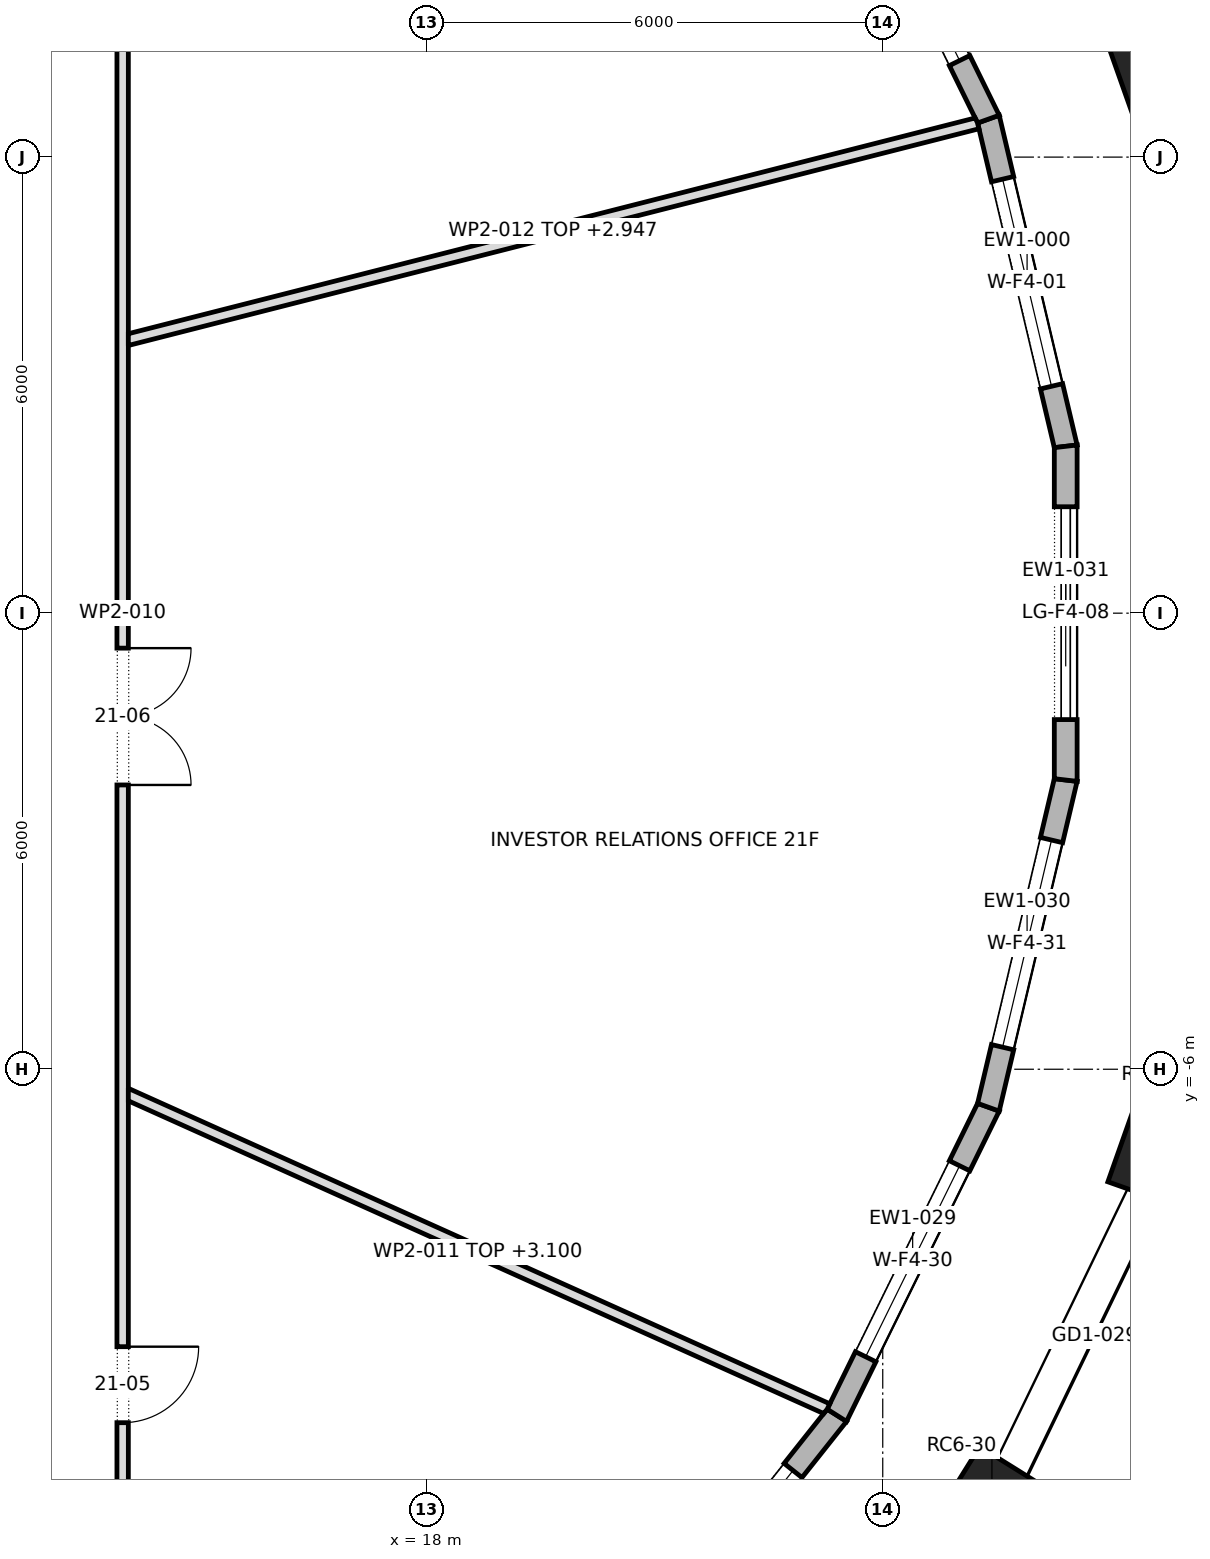
"""IFC4 building model, lengths in metres.
Left out: names, types, materials, properties, quantities, classifications, styles, units other than length and angle.
Written with IfcOpenShell. Run it as: python <this file> out.ifc"""

import sys

from ifc_helpers import new_model, si_unit, direction, frame, frame_2d, origin, origin_2d, place, context, subcontext, project, spatial, polyline, rectangle, outline, extrude, element, fill, save


model = new_model("IFC4")
c1 = context("Model", 3, precision=1e-05, world=origin(), true_north=direction((0.0, 1.0)))
c2 = subcontext(c1, "Body", "Model", "MODEL_VIEW")
j1 = project(units=[si_unit("LENGTHUNIT", "METRE"), si_unit("PLANEANGLEUNIT", "RADIAN")], contexts=[c1])
p1 = place(None, origin())
s1 = spatial("IfcSite", under=j1, at=p1, CompositionType="ELEMENT")
p2 = place(p1, origin())
s2 = spatial("IfcBuilding", under=s1, at=p2, CompositionType="ELEMENT")
p3 = place(p2, frame((0.0, 0.0, 300.3)))
s3 = spatial("IfcBuildingStorey", under=s2, at=p3, CompositionType="ELEMENT", Elevation=300.3)
for number, where, z_axis, x_axis in (
    (1, (27.6, 7.177, 0.0), (0.0, 0.0, 1.0), (-0.334, 0.943, 0.0)),
    (2, (25.437, -11.654, 0.0), (0.0, 0.0, 1.0), (0.529, 0.849, 0.0)),
    (3, (27.6, -7.177, 0.0), (0.0, 0.0, 1.0), (0.334, 0.943, 0.0)),
):
    element("IfcColumn", number, at=place(p3, frame(where, z_axis=z_axis, x_axis=x_axis)), inside=s3, PredefinedType="COLUMN", context=c2, shape_type="SweptSolid", body=[
        extrude(rectangle(XDim=1.0, YDim=1.0, at=origin_2d()), origin(), (0.0, 0.0, 1.0), 4.0),
    ])
p4 = place(p3, frame((26.407, 2.195, 0.0), z_axis=(0.0, 0.0, 1.0), x_axis=(-0.229943714271, 0.973203929435, 0.0)))
e4 = element("IfcWall", 4, at=p4, inside=s3, PredefinedType="STANDARD", context=c2, shape_type="SweptSolid", body=[
    extrude(outline(polyline([(-0.018, -0.15), (4.44, -0.15), (4.406, 0.15), (0.018, 0.15), (-0.018, -0.15)])), origin(), (0.0, 0.0, 1.0), 3.7),
])
p5 = place(p4, frame((0.812, 0.0, 0.6)))
e5 = element("IfcOpeningElement", 5, at=p5, cuts=e4, PredefinedType="OPENING", context=c2, shape_type="SweptSolid", body=[
    extrude(rectangle(XDim=2.8, YDim=2.65, at=frame_2d((1.4, 1.325))), frame((0.0, 0.162, 0.0), z_axis=(0.0, -1.0, 0.0), x_axis=(1.0, 0.0, 0.0)), (0.0, 0.0, 1.0), 0.324),
])
p6 = place(p3, frame((25.39, 6.5, 0.0), z_axis=(0.0, 0.0, 1.0), x_axis=(-0.441431671743, 0.897294867467, 0.0)))
e6 = element("IfcWall", 6, at=p6, inside=s3, PredefinedType="STANDARD", context=c2, shape_type="SweptSolid", body=[
    extrude(outline(polyline([(-0.017, -0.15), (4.533, -0.15), (4.501, 0.15), (0.017, 0.15), (-0.017, -0.15)])), origin(), (0.0, 0.0, 1.0), 3.7),
])
p7 = place(p6, frame((0.858, 0.0, 0.6)))
e7 = element("IfcOpeningElement", 7, at=p7, cuts=e6, PredefinedType="OPENING", context=c2, shape_type="SweptSolid", body=[
    extrude(rectangle(XDim=2.8, YDim=2.65, at=frame_2d((1.4, 1.325))), frame((0.0, 0.162, 0.0), z_axis=(0.0, -1.0, 0.0), x_axis=(1.0, 0.0, 0.0)), (0.0, 0.0, 1.0), 0.324),
])
p8 = place(p3, frame((20.503, -14.198, 0.0), z_axis=(0.0, 0.0, 1.0), x_axis=(0.621625671247, 0.783314448256, 0.0)))
e8 = element("IfcWall", 8, at=p8, inside=s3, PredefinedType="STANDARD", context=c2, shape_type="SweptSolid", body=[
    extrude(outline(polyline([(-0.015, -0.15), (4.67, -0.15), (4.637, 0.15), (0.015, 0.15), (-0.015, -0.15)])), origin(), (0.0, 0.0, 1.0), 3.7),
])
p9 = place(p8, frame((0.927, 0.0, 0.6)))
e9 = element("IfcOpeningElement", 9, at=p9, cuts=e8, PredefinedType="OPENING", context=c2, shape_type="SweptSolid", body=[
    extrude(rectangle(XDim=2.8, YDim=2.65, at=frame_2d((1.4, 1.325))), frame((0.0, 0.162, 0.0), z_axis=(0.0, -1.0, 0.0), x_axis=(1.0, 0.0, 0.0)), (0.0, 0.0, 1.0), 0.324),
])
p10 = place(p3, frame((23.396, -10.553, 0.0), z_axis=(0.0, 0.0, 1.0), x_axis=(0.441431671743, 0.897294867467, 0.0)))
e10 = element("IfcWall", 10, at=p10, inside=s3, PredefinedType="STANDARD", context=c2, shape_type="SweptSolid", body=[
    extrude(outline(polyline([(-0.016, -0.15), (4.534, -0.15), (4.5, 0.15), (0.016, 0.15), (-0.016, -0.15)])), origin(), (0.0, 0.0, 1.0), 3.7),
])
p11 = place(p10, frame((0.858, 0.0, 0.6)))
e11 = element("IfcOpeningElement", 11, at=p11, cuts=e10, PredefinedType="OPENING", context=c2, shape_type="SweptSolid", body=[
    extrude(rectangle(XDim=2.8, YDim=2.65, at=frame_2d((1.4, 1.325))), frame((0.0, 0.162, 0.0), z_axis=(0.0, -1.0, 0.0), x_axis=(1.0, 0.0, 0.0)), (0.0, 0.0, 1.0), 0.324),
])
p12 = place(p3, frame((25.39, -6.5, 0.0), z_axis=(0.0, 0.0, 1.0), x_axis=(0.229943714271, 0.973203929435, 0.0)))
e12 = element("IfcWall", 12, at=p12, inside=s3, PredefinedType="STANDARD", context=c2, shape_type="SweptSolid", body=[
    extrude(outline(polyline([(-0.017, -0.15), (4.441, -0.15), (4.406, 0.15), (0.017, 0.15), (-0.017, -0.15)])), origin(), (0.0, 0.0, 1.0), 3.7),
])
p13 = place(p12, frame((0.812, 0.0, 0.6)))
e13 = element("IfcOpeningElement", 13, at=p13, cuts=e12, PredefinedType="OPENING", context=c2, shape_type="SweptSolid", body=[
    extrude(rectangle(XDim=2.8, YDim=2.65, at=frame_2d((1.4, 1.325))), frame((0.0, 0.162, 0.0), z_axis=(0.0, -1.0, 0.0), x_axis=(1.0, 0.0, 0.0)), (0.0, 0.0, 1.0), 0.324),
])
p14 = place(p3, frame((26.407, -2.195, 0.0), z_axis=(0.0, 0.0, 1.0), x_axis=(0.0, 1.0, 0.0)))
e14 = element("IfcWall", 14, at=p14, inside=s3, PredefinedType="STANDARD", context=c2, shape_type="SweptSolid", body=[
    extrude(outline(polyline([(-0.018, -0.15), (4.408, -0.15), (4.373, 0.15), (0.018, 0.15), (-0.018, -0.15)])), origin(), (0.0, 0.0, 1.0), 3.7),
])
p15 = place(p14, frame((0.795, 0.0, 0.0)))
e15 = element("IfcOpeningElement", 15, at=p15, cuts=e14, PredefinedType="OPENING", context=c2, shape_type="SweptSolid", body=[
    extrude(rectangle(XDim=2.8, YDim=3.25, at=frame_2d((1.4, 1.625))), frame((0.0, 0.162, 0.0), z_axis=(0.0, -1.0, 0.0), x_axis=(1.0, 0.0, 0.0)), (0.0, 0.0, 1.0), 0.324),
])
p16 = place(p3, frame((14.0, -14.075, 0.0), z_axis=(0.0, 0.0, 1.0), x_axis=(0.0, 1.0, 0.0)))
e16 = element("IfcWall", 16, at=p16, inside=s3, PredefinedType="PARTITIONING", context=c2, shape_type="SweptSolid", body=[
    extrude(outline(polyline([(0.0, -0.075), (1.877, -0.075), (3.753, -0.075), (5.63, -0.075), (7.507, -0.075), (9.383, -0.075), (11.26, -0.075), (13.137, -0.075), (15.013, -0.075), (16.89, -0.075), (18.767, -0.075), (20.643, -0.075), (22.52, -0.075), (24.396, -0.075), (26.273, -0.075), (28.15, -0.075), (28.0, 0.075), (26.011, 0.075), (24.021, 0.075), (22.032, 0.075), (20.043, 0.075), (18.053, 0.075), (16.064, 0.075), (14.075, 0.075), (12.086, 0.075), (10.096, 0.075), (8.107, 0.075), (6.118, 0.075), (4.128, 0.075), (2.139, 0.075), (0.15, 0.075), (0.0, -0.075)])), origin(), (0.0, 0.0, 1.0), 3.7),
])
p17 = place(p16, frame((3.425, 0.0, 0.0)))
e17 = element("IfcOpeningElement", 17, at=p17, cuts=e16, PredefinedType="OPENING", context=c2, shape_type="SweptSolid", body=[
    extrude(rectangle(XDim=1.0, YDim=2.1, at=frame_2d((0.5, 1.05))), frame((0.0, 0.087, 0.0), z_axis=(0.0, -1.0, 0.0), x_axis=(1.0, 0.0, 0.0)), (0.0, 0.0, 1.0), 0.174),
])
p18 = place(p16, frame((11.815, 0.0, 0.0)))
e18 = element("IfcOpeningElement", 18, at=p18, cuts=e16, PredefinedType="OPENING", context=c2, shape_type="SweptSolid", body=[
    extrude(rectangle(XDim=1.8, YDim=2.1, at=frame_2d((0.9, 1.05))), frame((0.0, 0.087, 0.0), z_axis=(0.0, -1.0, 0.0), x_axis=(1.0, 0.0, 0.0)), (0.0, 0.0, 1.0), 0.174),
])
p19 = place(p16, frame((21.965, 0.0, 0.0)))
e19 = element("IfcOpeningElement", 19, at=p19, cuts=e16, PredefinedType="OPENING", context=c2, shape_type="SweptSolid", body=[
    extrude(rectangle(XDim=1.8, YDim=2.1, at=frame_2d((0.9, 1.05))), frame((0.0, 0.087, 0.0), z_axis=(0.0, -1.0, 0.0), x_axis=(1.0, 0.0, 0.0)), (0.0, 0.0, 1.0), 0.174),
])
p20 = place(p3, frame((14.045, -6.32, 0.0), z_axis=(0.0, 0.0, 1.0), x_axis=(0.912030730905, -0.410121867114, 0.0)))
e20 = element("IfcWall", 20, at=p20, inside=s3, PredefinedType="PARTITIONING", context=c2, shape_type="SweptSolid", body=[
    extrude(outline(polyline([(0.067, -0.075), (1.739, -0.075), (3.41, -0.075), (5.082, -0.075), (6.754, -0.075), (8.426, -0.075), (10.097, -0.075), (10.115, -0.004), (10.118, 0.073), (10.118, 0.075), (8.432, 0.075), (6.745, 0.075), (5.059, 0.075), (3.373, 0.075), (1.686, 0.075), (0.0, 0.075), (0.0, 0.074), (0.067, -0.075)])), origin(), (0.0, 0.0, 1.0), 3.1),
])
p21 = place(p3, frame((14.057, 3.594, 0.0), z_axis=(0.0, 0.0, 1.0), x_axis=(0.969049648941, 0.246865910742, 0.0)))
e21 = element("IfcWall", 21, at=p21, inside=s3, PredefinedType="PARTITIONING", context=c2, shape_type="SweptSolid", body=[
    extrude(outline(polyline([(11.548, -0.075), (11.548, 0.011), (11.535, 0.075), (9.618, 0.075), (7.702, 0.075), (5.786, 0.075), (3.87, 0.075), (1.954, 0.075), (0.038, 0.075), (0.0, -0.074), (0.0, -0.075), (1.925, -0.075), (3.849, -0.075), (5.774, -0.075), (7.699, -0.075), (9.624, -0.075), (11.548, -0.075)])), origin(), (0.0, 0.0, 1.0), 2.947),
])
p22 = place(p5, origin())
e22 = element("IfcWindow", 22, at=p22, inside=s3, PartitioningType="DOUBLE_PANEL_VERTICAL", PredefinedType="WINDOW", context=c2, shape_type="SweptSolid", body=[
    extrude(rectangle(XDim=2.8, YDim=2.65, at=frame_2d((1.4, 1.325))), frame((0.0, 0.03, 0.0), z_axis=(0.0, -1.0, 0.0), x_axis=(1.0, 0.0, 0.0)), (0.0, 0.0, 1.0), 0.06),
])
fill(e5, e22)
p23 = place(p7, origin())
e23 = element("IfcWindow", 23, at=p23, inside=s3, PartitioningType="DOUBLE_PANEL_VERTICAL", PredefinedType="WINDOW", context=c2, shape_type="SweptSolid", body=[
    extrude(rectangle(XDim=2.8, YDim=2.65, at=frame_2d((1.4, 1.325))), frame((0.0, 0.03, 0.0), z_axis=(0.0, -1.0, 0.0), x_axis=(1.0, 0.0, 0.0)), (0.0, 0.0, 1.0), 0.06),
])
fill(e7, e23)
p24 = place(p9, origin())
e24 = element("IfcWindow", 24, at=p24, inside=s3, PartitioningType="DOUBLE_PANEL_VERTICAL", PredefinedType="WINDOW", context=c2, shape_type="SweptSolid", body=[
    extrude(rectangle(XDim=2.8, YDim=2.65, at=frame_2d((1.4, 1.325))), frame((0.0, 0.03, 0.0), z_axis=(0.0, -1.0, 0.0), x_axis=(1.0, 0.0, 0.0)), (0.0, 0.0, 1.0), 0.06),
])
fill(e9, e24)
p25 = place(p11, origin())
e25 = element("IfcWindow", 25, at=p25, inside=s3, PartitioningType="DOUBLE_PANEL_VERTICAL", PredefinedType="WINDOW", context=c2, shape_type="SweptSolid", body=[
    extrude(rectangle(XDim=2.8, YDim=2.65, at=frame_2d((1.4, 1.325))), frame((0.0, 0.03, 0.0), z_axis=(0.0, -1.0, 0.0), x_axis=(1.0, 0.0, 0.0)), (0.0, 0.0, 1.0), 0.06),
])
fill(e11, e25)
p26 = place(p13, origin())
e26 = element("IfcWindow", 26, at=p26, inside=s3, PartitioningType="DOUBLE_PANEL_VERTICAL", PredefinedType="WINDOW", context=c2, shape_type="SweptSolid", body=[
    extrude(rectangle(XDim=2.8, YDim=2.65, at=frame_2d((1.4, 1.325))), frame((0.0, 0.03, 0.0), z_axis=(0.0, -1.0, 0.0), x_axis=(1.0, 0.0, 0.0)), (0.0, 0.0, 1.0), 0.06),
])
fill(e13, e26)
p27 = place(p15, origin())
e27 = element("IfcDoor", 27, at=p27, inside=s3, OperationType="DOUBLE_DOOR_SLIDING", PredefinedType="DOOR", context=c2, shape_type="SweptSolid", body=[
    extrude(rectangle(XDim=2.8, YDim=3.25, at=frame_2d((1.4, 1.625))), frame((0.0, 0.025, 0.0), z_axis=(0.0, -1.0, 0.0), x_axis=(1.0, 0.0, 0.0)), (0.0, 0.0, 1.0), 0.05),
])
fill(e15, e27)
p28 = place(p17, frame((1.0, 0.0, 0.0), z_axis=(0.0, 0.0, 1.0), x_axis=(-1.0, 0.0, 0.0)))
e28 = element("IfcDoor", 28, at=p28, inside=s3, OperationType="SINGLE_SWING_RIGHT", PredefinedType="DOOR", context=c2, shape_type="SweptSolid", body=[
    extrude(rectangle(XDim=1.0, YDim=2.1, at=frame_2d((0.5, 1.05))), frame((0.0, 0.025, 0.0), z_axis=(0.0, -1.0, 0.0), x_axis=(1.0, 0.0, 0.0)), (0.0, 0.0, 1.0), 0.05),
])
fill(e17, e28)
p29 = place(p18, frame((1.8, 0.0, 0.0), z_axis=(0.0, 0.0, 1.0), x_axis=(-1.0, 0.0, 0.0)))
e29 = element("IfcDoor", 29, at=p29, inside=s3, OperationType="DOUBLE_DOOR_SINGLE_SWING", PredefinedType="DOOR", context=c2, shape_type="SweptSolid", body=[
    extrude(rectangle(XDim=1.8, YDim=2.1, at=frame_2d((0.9, 1.05))), frame((0.0, 0.025, 0.0), z_axis=(0.0, -1.0, 0.0), x_axis=(1.0, 0.0, 0.0)), (0.0, 0.0, 1.0), 0.05),
])
fill(e18, e29)
save(model, sys.argv[1])
